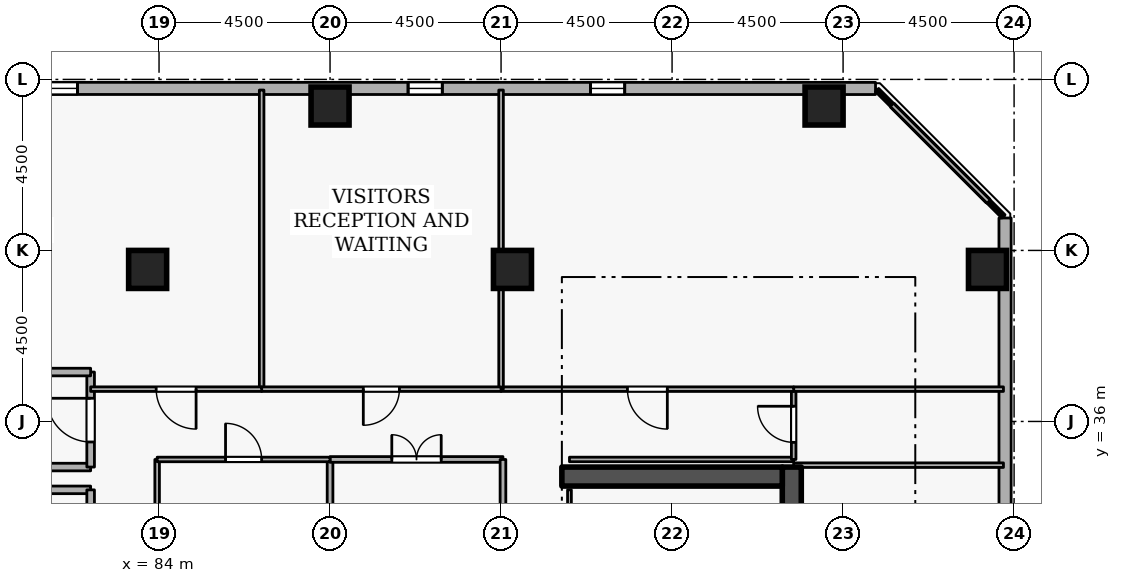
"""IFC4 building model, lengths in metres.
Left out: names, types, materials, properties, quantities, classifications, styles, units other than length and angle.
Written with IfcOpenShell. Run it as: python <this file> out.ifc"""

import sys

from ifc_helpers import new_model, si_unit, direction, frame, frame_2d, origin, origin_2d, place, context, subcontext, project, spatial, rectangle, extrude, element, fill, save


model = new_model("IFC4")
c1 = context("Model", 3, precision=1e-05, world=origin(), true_north=direction((0.0, 1.0)))
c2 = subcontext(c1, "Body", "Model", "MODEL_VIEW")
j1 = project(units=[si_unit("LENGTHUNIT", "METRE"), si_unit("PLANEANGLEUNIT", "RADIAN")], contexts=[c1])
p1 = place(None, origin())
s1 = spatial("IfcSite", under=j1, at=p1, CompositionType="ELEMENT")
p2 = place(p1, origin())
s2 = spatial("IfcBuilding", under=s1, at=p2, CompositionType="ELEMENT")
p3 = place(p2, frame((0.0, 0.0, 210.9)))
s3 = spatial("IfcBuildingStorey", under=s2, at=p3, CompositionType="ELEMENT", Elevation=210.9)
p4 = place(p3, frame((100.65, 19.2, 0.0), z_axis=(0.0, 0.0, 1.0), x_axis=(0.0, 1.0, 0.0)))
e1 = element("IfcWall", 1, at=p4, inside=s3, PredefinedType="SHEAR", context=c2, shape_type="SweptSolid", body=[
    extrude(rectangle(XDim=15.6, YDim=0.5, at=frame_2d((7.8, 0.0))), origin(), (0.0, 0.0, 1.0), 3.6),
])
p5 = place(p3, frame((94.6, 34.55, 0.0), z_axis=(0.0, 0.0, 1.0), x_axis=(1.0, 0.0, 0.0)))
e2 = element("IfcWall", 2, at=p5, inside=s3, PredefinedType="SHEAR", context=c2, shape_type="SweptSolid", body=[
    extrude(rectangle(XDim=5.8, YDim=0.5, at=frame_2d((2.9, 0.0))), origin(), (0.0, 0.0, 1.0), 3.6),
])
for number, where, z_axis, x_axis in (
    (3, (105.8, 40.0, 0.0), (0.0, 0.0, 1.0), (1.0, 0.0, 0.0)),
    (4, (101.5, 44.3, 0.0), (0.0, 0.0, 1.0), (1.0, 0.0, 0.0)),
    (5, (88.5, 44.3, 0.0), (0.0, 0.0, 1.0), (1.0, 0.0, 0.0)),
    (6, (93.3, 40.0, 0.0), (0.0, 0.0, 1.0), (1.0, 0.0, 0.0)),
    (7, (83.7, 40.0, 0.0), (0.0, 0.0, 1.0), (1.0, 0.0, 0.0)),
):
    element("IfcColumn", number, at=place(p3, frame(where, z_axis=z_axis, x_axis=x_axis)), inside=s3, PredefinedType="COLUMN", context=c2, shape_type="SweptSolid", body=[
        extrude(rectangle(XDim=1.0, YDim=1.0, at=origin_2d()), origin(), (0.0, 0.0, 1.0), 3.6),
    ])
p6 = place(p3, frame((106.265, 5.819, 0.0), z_axis=(0.0, 0.0, 1.0), x_axis=(-7.5574884e-05, 0.999999997144, 0.0)))
e8 = element("IfcWall", 8, at=p6, inside=s3, PredefinedType="STANDARD", context=c2, shape_type="SweptSolid", body=[
    extrude(rectangle(XDim=35.535, YDim=0.32, at=frame_2d((17.768, 0.0))), origin(), (0.0, 0.0, 1.0), 2.7),
])
p7 = place(p6, frame((1.8, 0.0, 0.72)))
e9 = element("IfcOpeningElement", 9, at=p7, cuts=e8, PredefinedType="OPENING", context=c2, shape_type="SweptSolid", body=[
    extrude(rectangle(XDim=0.9, YDim=1.75, at=frame_2d((0.45, 0.875))), frame((0.0, 0.17, 0.0), z_axis=(0.0, -1.0, 0.0), x_axis=(1.0, 0.0, 0.0)), (0.0, 0.0, 1.0), 0.34),
])
p8 = place(p6, frame((11.4, 0.0, 0.72)))
e10 = element("IfcOpeningElement", 10, at=p8, cuts=e8, PredefinedType="OPENING", context=c2, shape_type="SweptSolid", body=[
    extrude(rectangle(XDim=0.9, YDim=1.75, at=frame_2d((0.45, 0.875))), frame((0.0, 0.17, 0.0), z_axis=(0.0, -1.0, 0.0), x_axis=(1.0, 0.0, 0.0)), (0.0, 0.0, 1.0), 0.34),
])
p9 = place(p6, frame((16.2, 0.0, 0.72)))
e11 = element("IfcOpeningElement", 11, at=p9, cuts=e8, PredefinedType="OPENING", context=c2, shape_type="SweptSolid", body=[
    extrude(rectangle(XDim=0.9, YDim=1.75, at=frame_2d((0.45, 0.875))), frame((0.0, 0.17, 0.0), z_axis=(0.0, -1.0, 0.0), x_axis=(1.0, 0.0, 0.0)), (0.0, 0.0, 1.0), 0.34),
])
p10 = place(p6, frame((25.8, 0.0, 0.72)))
e12 = element("IfcOpeningElement", 12, at=p10, cuts=e8, PredefinedType="OPENING", context=c2, shape_type="SweptSolid", body=[
    extrude(rectangle(XDim=0.9, YDim=1.75, at=frame_2d((0.45, 0.875))), frame((0.0, 0.17, 0.0), z_axis=(0.0, -1.0, 0.0), x_axis=(1.0, 0.0, 0.0)), (0.0, 0.0, 1.0), 0.34),
])
p11 = place(p3, frame((102.854, 44.762, 0.0), z_axis=(0.0, 0.0, 1.0), x_axis=(-0.999999997144, 7.5574884e-05, 0.0)))
e13 = element("IfcWall", 13, at=p11, inside=s3, PredefinedType="STANDARD", context=c2, shape_type="SweptSolid", body=[
    extrude(rectangle(XDim=35.535, YDim=0.32, at=frame_2d((17.768, 0.0))), origin(), (0.0, 0.0, 1.0), 2.7),
])
p12 = place(p11, frame((6.6, 0.0, 0.72)))
e14 = element("IfcOpeningElement", 14, at=p12, cuts=e13, PredefinedType="OPENING", context=c2, shape_type="SweptSolid", body=[
    extrude(rectangle(XDim=0.9, YDim=1.75, at=frame_2d((0.45, 0.875))), frame((0.0, 0.17, 0.0), z_axis=(0.0, -1.0, 0.0), x_axis=(1.0, 0.0, 0.0)), (0.0, 0.0, 1.0), 0.34),
])
p13 = place(p11, frame((11.4, 0.0, 0.72)))
e15 = element("IfcOpeningElement", 15, at=p13, cuts=e13, PredefinedType="OPENING", context=c2, shape_type="SweptSolid", body=[
    extrude(rectangle(XDim=0.9, YDim=1.75, at=frame_2d((0.45, 0.875))), frame((0.0, 0.17, 0.0), z_axis=(0.0, -1.0, 0.0), x_axis=(1.0, 0.0, 0.0)), (0.0, 0.0, 1.0), 0.34),
])
p14 = place(p11, frame((21.0, 0.0, 0.72)))
e16 = element("IfcOpeningElement", 16, at=p14, cuts=e13, PredefinedType="OPENING", context=c2, shape_type="SweptSolid", body=[
    extrude(rectangle(XDim=0.9, YDim=1.75, at=frame_2d((0.45, 0.875))), frame((0.0, 0.17, 0.0), z_axis=(0.0, -1.0, 0.0), x_axis=(1.0, 0.0, 0.0)), (0.0, 0.0, 1.0), 0.34),
])
p15 = place(p11, frame((30.6, 0.0, 0.72)))
e17 = element("IfcOpeningElement", 17, at=p15, cuts=e13, PredefinedType="OPENING", context=c2, shape_type="SweptSolid", body=[
    extrude(rectangle(XDim=0.9, YDim=1.75, at=frame_2d((0.45, 0.875))), frame((0.0, 0.17, 0.0), z_axis=(0.0, -1.0, 0.0), x_axis=(1.0, 0.0, 0.0)), (0.0, 0.0, 1.0), 0.34),
])
p16 = place(p3, frame((79.9, 34.8, 0.0), z_axis=(0.0, 0.0, 1.0), x_axis=(1.0, 0.0, 0.0)))
e18 = element("IfcWall", 18, at=p16, inside=s3, PredefinedType="STANDARD", context=c2, shape_type="SweptSolid", body=[
    extrude(rectangle(XDim=2.3, YDim=0.2, at=frame_2d((1.15, 0.0))), origin(), (0.0, 0.0, 1.0), 2.545),
])
p17 = place(p3, frame((82.2, 34.8, 0.0), z_axis=(0.0, 0.0, 1.0), x_axis=(0.0, 1.0, 0.0)))
e19 = element("IfcWall", 19, at=p17, inside=s3, PredefinedType="STANDARD", context=c2, shape_type="SweptSolid", body=[
    extrude(rectangle(XDim=2.5, YDim=0.2, at=frame_2d((1.25, 0.0))), origin(), (0.0, 0.0, 1.0), 3.34),
])
p18 = place(p17, frame((0.66, 0.0, 0.0)))
e20 = element("IfcOpeningElement", 20, at=p18, cuts=e19, PredefinedType="OPENING", context=c2, shape_type="SweptSolid", body=[
    extrude(rectangle(XDim=1.15, YDim=2.1, at=frame_2d((0.575, 1.05))), frame((0.0, 0.11, 0.0), z_axis=(0.0, -1.0, 0.0), x_axis=(1.0, 0.0, 0.0)), (0.0, 0.0, 1.0), 0.22),
])
p19 = place(p3, frame((82.2, 37.3, 0.0), z_axis=(0.0, 0.0, 1.0), x_axis=(-1.0, 0.0, 0.0)))
e21 = element("IfcWall", 21, at=p19, inside=s3, PredefinedType="STANDARD", context=c2, shape_type="SweptSolid", body=[
    extrude(rectangle(XDim=5.7, YDim=0.2, at=frame_2d((2.85, 0.0))), origin(), (0.0, 0.0, 1.0), 3.34),
])
p20 = place(p3, frame((80.15, 34.2, 0.0), z_axis=(0.0, 0.0, 1.0), x_axis=(1.0, 0.0, 0.0)))
e22 = element("IfcWall", 22, at=p20, inside=s3, PredefinedType="STANDARD", context=c2, shape_type="SweptSolid", body=[
    extrude(rectangle(XDim=2.05, YDim=0.2, at=frame_2d((1.025, 0.0))), origin(), (0.0, 0.0, 1.0), 2.545),
])
p21 = place(p3, frame((82.2, 34.2, 0.0), z_axis=(0.0, 0.0, 1.0), x_axis=(0.0, -1.0, 0.0)))
e23 = element("IfcWall", 23, at=p21, inside=s3, PredefinedType="STANDARD", context=c2, shape_type="SweptSolid", body=[
    extrude(rectangle(XDim=2.35, YDim=0.2, at=frame_2d((1.175, 0.0))), origin(), (0.0, 0.0, 1.0), 3.34),
])
p22 = place(p21, frame((0.6, 0.0, 0.0)))
e24 = element("IfcOpeningElement", 24, at=p22, cuts=e23, PredefinedType="OPENING", context=c2, shape_type="SweptSolid", body=[
    extrude(rectangle(XDim=1.15, YDim=2.1, at=frame_2d((0.575, 1.05))), frame((0.0, 0.11, 0.0), z_axis=(0.0, -1.0, 0.0), x_axis=(1.0, 0.0, 0.0)), (0.0, 0.0, 1.0), 0.22),
])
p23 = place(p3, frame((94.8, 32.05, 0.0), z_axis=(0.0, 0.0, 1.0), x_axis=(0.0, 1.0, 0.0)))
e25 = element("IfcWall", 25, at=p23, inside=s3, PredefinedType="PARTITIONING", context=c2, shape_type="SweptSolid", body=[
    extrude(rectangle(XDim=2.15, YDim=0.1, at=frame_2d((1.075, 0.0))), origin(), (0.0, 0.0, 1.0), 3.34),
])
p24 = place(p23, frame((0.6, 0.0, 0.0)))
e26 = element("IfcOpeningElement", 26, at=p24, cuts=e25, PredefinedType="OPENING", context=c2, shape_type="SweptSolid", body=[
    extrude(rectangle(XDim=0.95, YDim=2.1, at=frame_2d((0.475, 1.05))), frame((0.0, 0.06, 0.0), z_axis=(0.0, -1.0, 0.0), x_axis=(1.0, 0.0, 0.0)), (0.0, 0.0, 1.0), 0.12),
])
p25 = place(p3, frame((94.8, 35.0, 0.0), z_axis=(0.0, 0.0, 1.0), x_axis=(1.0, 0.0, 0.0)))
e27 = element("IfcWall", 27, at=p25, inside=s3, PredefinedType="PARTITIONING", context=c2, shape_type="SweptSolid", body=[
    extrude(rectangle(XDim=5.9, YDim=0.12, at=frame_2d((2.95, 0.0))), origin(), (0.0, 0.0, 1.0), 3.34),
])
p26 = place(p3, frame((100.7, 35.0, 0.0), z_axis=(0.0, 0.0, 1.0), x_axis=(0.0, 1.0, 0.0)))
e28 = element("IfcWall", 28, at=p26, inside=s3, PredefinedType="PARTITIONING", context=c2, shape_type="SweptSolid", body=[
    extrude(rectangle(XDim=1.85, YDim=0.12, at=frame_2d((0.925, 0.0))), origin(), (0.0, 0.0, 1.0), 3.34),
])
p27 = place(p26, frame((0.45, 0.0, 0.0)))
e29 = element("IfcOpeningElement", 29, at=p27, cuts=e28, PredefinedType="OPENING", context=c2, shape_type="SweptSolid", body=[
    extrude(rectangle(XDim=0.95, YDim=2.1, at=frame_2d((0.475, 1.05))), frame((0.0, 0.07, 0.0), z_axis=(0.0, -1.0, 0.0), x_axis=(1.0, 0.0, 0.0)), (0.0, 0.0, 1.0), 0.14),
])
for number, where, z_axis, x_axis in (
    (30, (100.7, 36.85, 0.0), (0.0, 0.0, 1.0), (1.0, 0.0, 0.0)),
    (31, (106.22, 34.85, 0.0), (0.0, 0.0, 1.0), (-1.0, 0.0, 0.0)),
):
    element("IfcWall", number, at=place(p3, frame(where, z_axis=z_axis, x_axis=x_axis)), inside=s3, PredefinedType="PARTITIONING", context=c2, shape_type="SweptSolid", body=[
        extrude(rectangle(XDim=5.52, YDim=0.12, at=frame_2d((2.76, 0.0))), origin(), (0.0, 0.0, 1.0), 3.34),
    ])
p28 = place(p3, frame((100.7, 36.85, 0.0), z_axis=(0.0, 0.0, 1.0), x_axis=(-1.0, 0.0, 0.0)))
e32 = element("IfcWall", 32, at=p28, inside=s3, PredefinedType="PARTITIONING", context=c2, shape_type="SweptSolid", body=[
    extrude(rectangle(XDim=7.7, YDim=0.12, at=frame_2d((3.85, 0.0))), origin(), (0.0, 0.0, 1.0), 3.34),
])
p29 = place(p28, frame((3.325, 0.0, 0.0)))
e33 = element("IfcOpeningElement", 33, at=p29, cuts=e32, PredefinedType="OPENING", context=c2, shape_type="SweptSolid", body=[
    extrude(rectangle(XDim=1.05, YDim=2.1, at=frame_2d((0.525, 1.05))), frame((0.0, 0.07, 0.0), z_axis=(0.0, -1.0, 0.0), x_axis=(1.0, 0.0, 0.0)), (0.0, 0.0, 1.0), 0.14),
])
p30 = place(p3, frame((93.0, 36.85, 0.0), z_axis=(0.0, 0.0, 1.0), x_axis=(0.0, 1.0, 0.0)))
e34 = element("IfcWall", 34, at=p30, inside=s3, PredefinedType="PARTITIONING", context=c2, shape_type="SweptSolid", body=[
    extrude(rectangle(XDim=7.87, YDim=0.12, at=frame_2d((3.935, 0.0))), origin(), (0.0, 0.0, 1.0), 3.34),
])
p31 = place(p3, frame((102.894, 44.72, 0.0), z_axis=(0.0, 0.0, 1.0), x_axis=(0.707106781187, -0.707106781187, 0.0)))
e35 = element("IfcWall", 35, at=p31, inside=s3, PredefinedType="PARTITIONING", context=c2, shape_type="SweptSolid", body=[
    extrude(rectangle(XDim=4.703, YDim=0.12, at=frame_2d((2.352, 0.0))), origin(), (0.0, 0.0, 1.0), 3.34),
])
p32 = place(p3, frame((86.7, 36.85, 0.0), z_axis=(0.0, 0.0, 1.0), x_axis=(0.0, 1.0, 0.0)))
e36 = element("IfcWall", 36, at=p32, inside=s3, PredefinedType="PARTITIONING", context=c2, shape_type="SweptSolid", body=[
    extrude(rectangle(XDim=7.87, YDim=0.12, at=frame_2d((3.935, 0.0))), origin(), (0.0, 0.0, 1.0), 3.34),
])
p33 = place(p3, frame((93.0, 36.85, 0.0), z_axis=(0.0, 0.0, 1.0), x_axis=(-1.0, 0.0, 0.0)))
e37 = element("IfcWall", 37, at=p33, inside=s3, PredefinedType="PARTITIONING", context=c2, shape_type="SweptSolid", body=[
    extrude(rectangle(XDim=6.3, YDim=0.12, at=frame_2d((3.15, 0.0))), origin(), (0.0, 0.0, 1.0), 3.34),
])
p34 = place(p33, frame((2.675, 0.0, 0.0)))
e38 = element("IfcOpeningElement", 38, at=p34, cuts=e37, PredefinedType="OPENING", context=c2, shape_type="SweptSolid", body=[
    extrude(rectangle(XDim=0.95, YDim=2.1, at=frame_2d((0.475, 1.05))), frame((0.0, 0.07, 0.0), z_axis=(0.0, -1.0, 0.0), x_axis=(1.0, 0.0, 0.0)), (0.0, 0.0, 1.0), 0.14),
])
p35 = place(p3, frame((86.7, 36.85, 0.0), z_axis=(0.0, 0.0, 1.0), x_axis=(-1.0, 0.0, 0.0)))
e39 = element("IfcWall", 39, at=p35, inside=s3, PredefinedType="PARTITIONING", context=c2, shape_type="SweptSolid", body=[
    extrude(rectangle(XDim=4.5, YDim=0.12, at=frame_2d((2.25, 0.0))), origin(), (0.0, 0.0, 1.0), 3.34),
])
p36 = place(p35, frame((1.725, 0.0, 0.0)))
e40 = element("IfcOpeningElement", 40, at=p36, cuts=e39, PredefinedType="OPENING", context=c2, shape_type="SweptSolid", body=[
    extrude(rectangle(XDim=1.05, YDim=2.1, at=frame_2d((0.525, 1.05))), frame((0.0, 0.07, 0.0), z_axis=(0.0, -1.0, 0.0), x_axis=(1.0, 0.0, 0.0)), (0.0, 0.0, 1.0), 0.14),
])
p37 = place(p3, frame((88.5, 32.2, 0.0), z_axis=(0.0, 0.0, 1.0), x_axis=(0.0, 1.0, 0.0)))
e41 = element("IfcWall", 41, at=p37, inside=s3, PredefinedType="PARTITIONING", context=c2, shape_type="SweptSolid", body=[
    extrude(rectangle(XDim=2.8, YDim=0.15, at=frame_2d((1.4, 0.0))), origin(), (0.0, 0.0, 1.0), 2.878),
])
p38 = place(p3, frame((88.5, 35.0, 0.0), z_axis=(0.0, 0.0, 1.0), x_axis=(1.0, 0.0, 0.0)))
e42 = element("IfcWall", 42, at=p38, inside=s3, PredefinedType="PARTITIONING", context=c2, shape_type="SweptSolid", body=[
    extrude(rectangle(XDim=4.55, YDim=0.15, at=frame_2d((2.275, 0.0))), origin(), (0.0, 0.0, 1.0), 3.34),
])
p39 = place(p38, frame((1.625, 0.0, 0.0)))
e43 = element("IfcOpeningElement", 43, at=p39, cuts=e42, PredefinedType="OPENING", context=c2, shape_type="SweptSolid", body=[
    extrude(rectangle(XDim=1.3, YDim=2.12, at=frame_2d((0.65, 1.06))), frame((0.0, 0.085, 0.0), z_axis=(0.0, -1.0, 0.0), x_axis=(1.0, 0.0, 0.0)), (0.0, 0.0, 1.0), 0.17),
])
p40 = place(p3, frame((93.05, 35.0, 0.0), z_axis=(0.0, 0.0, 1.0), x_axis=(0.0, -1.0, 0.0)))
e44 = element("IfcWall", 44, at=p40, inside=s3, PredefinedType="PARTITIONING", context=c2, shape_type="SweptSolid", body=[
    extrude(rectangle(XDim=2.8, YDim=0.15, at=frame_2d((1.4, 0.0))), origin(), (0.0, 0.0, 1.0), 3.34),
])
p41 = place(p3, frame((83.95, 32.2, 0.0), z_axis=(0.0, 0.0, 1.0), x_axis=(0.0, 1.0, 0.0)))
e45 = element("IfcWall", 45, at=p41, inside=s3, PredefinedType="PARTITIONING", context=c2, shape_type="SweptSolid", body=[
    extrude(rectangle(XDim=2.8, YDim=0.12, at=frame_2d((1.4, 0.0))), origin(), (0.0, 0.0, 1.0), 3.34),
])
p42 = place(p3, frame((83.95, 35.0, 0.0), z_axis=(0.0, 0.0, 1.0), x_axis=(1.0, 0.0, 0.0)))
e46 = element("IfcWall", 46, at=p42, inside=s3, PredefinedType="PARTITIONING", context=c2, shape_type="SweptSolid", body=[
    extrude(rectangle(XDim=4.55, YDim=0.12, at=frame_2d((2.275, 0.0))), origin(), (0.0, 0.0, 1.0), 3.34),
])
p43 = place(p42, frame((1.8, 0.0, 0.0)))
e47 = element("IfcOpeningElement", 47, at=p43, cuts=e46, PredefinedType="OPENING", context=c2, shape_type="SweptSolid", body=[
    extrude(rectangle(XDim=0.95, YDim=2.1, at=frame_2d((0.475, 1.05))), frame((0.0, 0.07, 0.0), z_axis=(0.0, -1.0, 0.0), x_axis=(1.0, 0.0, 0.0)), (0.0, 0.0, 1.0), 0.14),
])
p44 = place(p12, origin())
e48 = element("IfcWindow", 48, at=p44, inside=s3, PartitioningType="SINGLE_PANEL", PredefinedType="WINDOW", context=c2, shape_type="SweptSolid", body=[
    extrude(rectangle(XDim=0.9, YDim=1.75, at=frame_2d((0.45, 0.875))), frame((0.0, 0.03, 0.0), z_axis=(0.0, -1.0, 0.0), x_axis=(1.0, 0.0, 0.0)), (0.0, 0.0, 1.0), 0.06),
])
fill(e14, e48)
p45 = place(p13, origin())
e49 = element("IfcWindow", 49, at=p45, inside=s3, PartitioningType="SINGLE_PANEL", PredefinedType="WINDOW", context=c2, shape_type="SweptSolid", body=[
    extrude(rectangle(XDim=0.9, YDim=1.75, at=frame_2d((0.45, 0.875))), frame((0.0, 0.03, 0.0), z_axis=(0.0, -1.0, 0.0), x_axis=(1.0, 0.0, 0.0)), (0.0, 0.0, 1.0), 0.06),
])
fill(e15, e49)
p46 = place(p14, origin())
e50 = element("IfcWindow", 50, at=p46, inside=s3, PartitioningType="SINGLE_PANEL", PredefinedType="WINDOW", context=c2, shape_type="SweptSolid", body=[
    extrude(rectangle(XDim=0.9, YDim=1.75, at=frame_2d((0.45, 0.875))), frame((0.0, 0.03, 0.0), z_axis=(0.0, -1.0, 0.0), x_axis=(1.0, 0.0, 0.0)), (0.0, 0.0, 1.0), 0.06),
])
fill(e16, e50)
p47 = place(p18, origin())
e51 = element("IfcDoor", 51, at=p47, inside=s3, OperationType="SINGLE_SWING_RIGHT", PredefinedType="DOOR", context=c2, shape_type="SweptSolid", body=[
    extrude(rectangle(XDim=1.15, YDim=2.1, at=frame_2d((0.575, 1.05))), frame((0.0, 0.025, 0.0), z_axis=(0.0, -1.0, 0.0), x_axis=(1.0, 0.0, 0.0)), (0.0, 0.0, 1.0), 0.05),
])
fill(e20, e51)
p48 = place(p27, origin())
e52 = element("IfcDoor", 52, at=p48, inside=s3, OperationType="SINGLE_SWING_RIGHT", PredefinedType="DOOR", context=c2, shape_type="SweptSolid", body=[
    extrude(rectangle(XDim=0.95, YDim=2.1, at=frame_2d((0.475, 1.05))), frame((0.0, 0.025, 0.0), z_axis=(0.0, -1.0, 0.0), x_axis=(1.0, 0.0, 0.0)), (0.0, 0.0, 1.0), 0.05),
])
fill(e29, e52)
p49 = place(p29, origin())
e53 = element("IfcDoor", 53, at=p49, inside=s3, OperationType="SINGLE_SWING_LEFT", PredefinedType="DOOR", context=c2, shape_type="SweptSolid", body=[
    extrude(rectangle(XDim=1.05, YDim=2.1, at=frame_2d((0.525, 1.05))), frame((0.0, 0.025, 0.0), z_axis=(0.0, -1.0, 0.0), x_axis=(1.0, 0.0, 0.0)), (0.0, 0.0, 1.0), 0.05),
])
fill(e33, e53)
p50 = place(p34, origin())
e54 = element("IfcDoor", 54, at=p50, inside=s3, OperationType="SINGLE_SWING_RIGHT", PredefinedType="DOOR", context=c2, shape_type="SweptSolid", body=[
    extrude(rectangle(XDim=0.95, YDim=2.1, at=frame_2d((0.475, 1.05))), frame((0.0, 0.025, 0.0), z_axis=(0.0, -1.0, 0.0), x_axis=(1.0, 0.0, 0.0)), (0.0, 0.0, 1.0), 0.05),
])
fill(e38, e54)
p51 = place(p36, origin())
e55 = element("IfcDoor", 55, at=p51, inside=s3, OperationType="SINGLE_SWING_LEFT", PredefinedType="DOOR", context=c2, shape_type="SweptSolid", body=[
    extrude(rectangle(XDim=1.05, YDim=2.1, at=frame_2d((0.525, 1.05))), frame((0.0, 0.025, 0.0), z_axis=(0.0, -1.0, 0.0), x_axis=(1.0, 0.0, 0.0)), (0.0, 0.0, 1.0), 0.05),
])
fill(e40, e55)
p52 = place(p39, origin())
e56 = element("IfcDoor", 56, at=p52, inside=s3, OperationType="DOUBLE_DOOR_SINGLE_SWING", PredefinedType="DOOR", context=c2, shape_type="SweptSolid", body=[
    extrude(rectangle(XDim=1.3, YDim=2.12, at=frame_2d((0.65, 1.06))), frame((0.0, 0.025, 0.0), z_axis=(0.0, -1.0, 0.0), x_axis=(1.0, 0.0, 0.0)), (0.0, 0.0, 1.0), 0.05),
])
fill(e43, e56)
p53 = place(p43, origin())
e57 = element("IfcDoor", 57, at=p53, inside=s3, OperationType="SINGLE_SWING_LEFT", PredefinedType="DOOR", context=c2, shape_type="SweptSolid", body=[
    extrude(rectangle(XDim=0.95, YDim=2.1, at=frame_2d((0.475, 1.05))), frame((0.0, 0.025, 0.0), z_axis=(0.0, -1.0, 0.0), x_axis=(1.0, 0.0, 0.0)), (0.0, 0.0, 1.0), 0.05),
])
fill(e47, e57)
save(model, sys.argv[1])
